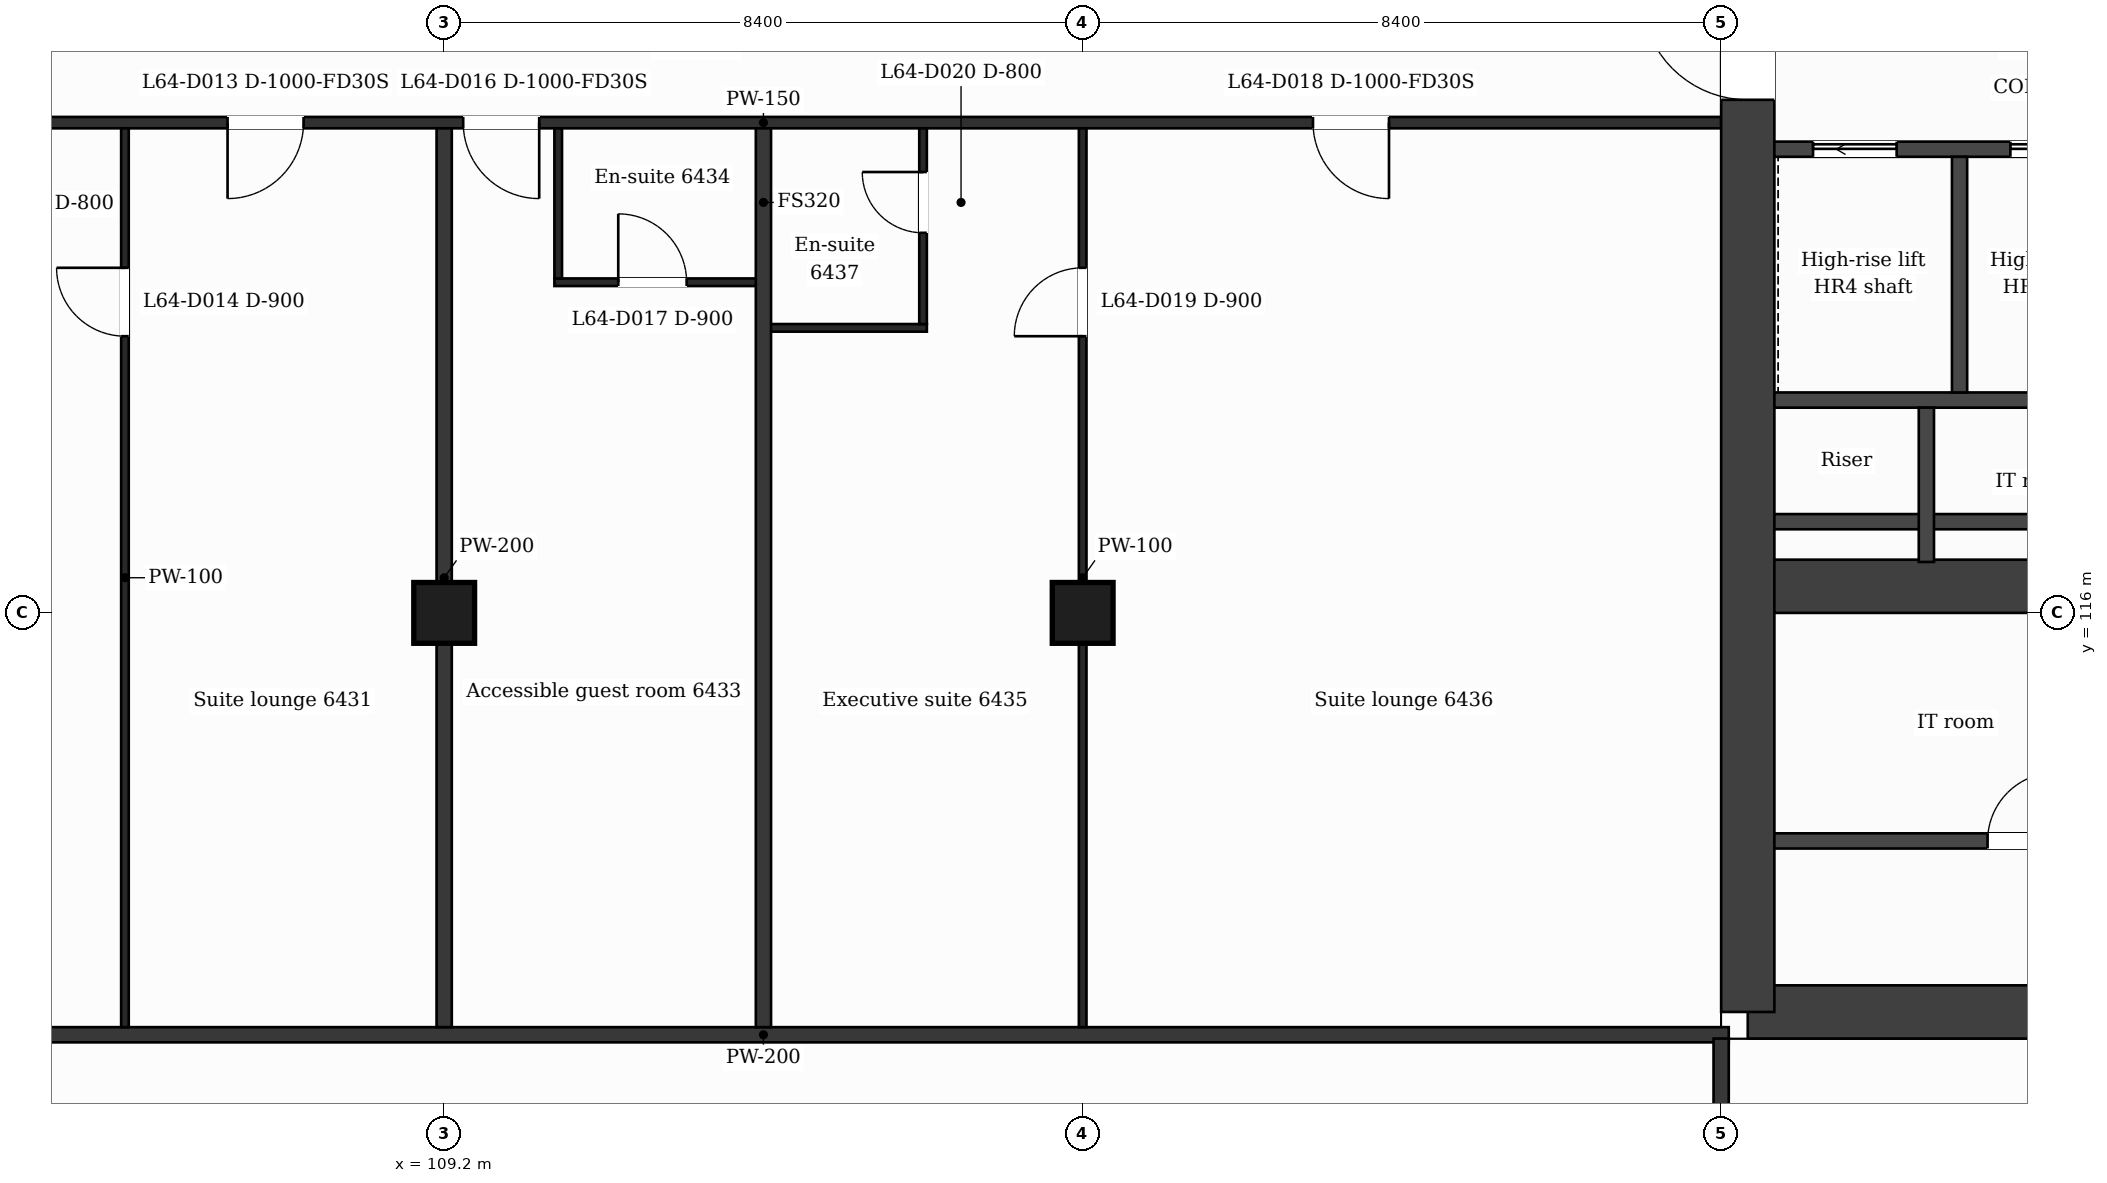
"""IFC4 building model, lengths in metres.
Left out: names, types, materials, properties, quantities, classifications, styles, units other than length and angle.
Written with IfcOpenShell. Run it as: python <this file> out.ifc"""

import sys

from ifc_helpers import new_model, si_unit, direction, frame, frame_2d, origin, origin_2d, place, context, subcontext, project, spatial, rectangle, extrude, element, fill, save


model = new_model("IFC4")
c1 = context("Model", 3, precision=1e-05, world=origin(), true_north=direction((0.0, 1.0)))
c2 = subcontext(c1, "Body", "Model", "MODEL_VIEW")
j1 = project(units=[si_unit("LENGTHUNIT", "METRE"), si_unit("PLANEANGLEUNIT", "RADIAN")], contexts=[c1])
p1 = place(None, origin())
s1 = spatial("IfcSite", under=j1, at=p1, CompositionType="ELEMENT")
p2 = place(p1, origin())
s2 = spatial("IfcBuilding", under=s1, at=p2, CompositionType="ELEMENT")
p3 = place(p2, frame((0.0, 0.0, 266.4)))
s3 = spatial("IfcBuildingStorey", under=s2, at=p3, CompositionType="ELEMENT", Elevation=266.4)
p4 = place(p3, frame((140.73, 110.75, 0.0), z_axis=(0.0, 0.0, 1.0), x_axis=(-1.0, 0.0, 0.0)))
e1 = element("IfcWall", 1, at=p4, inside=s3, PredefinedType="SHEAR", context=c2, shape_type="SweptSolid", body=[
    extrude(rectangle(XDim=14.38, YDim=0.7, at=frame_2d((7.19, 0.0))), origin(), (0.0, 0.0, 1.0), 3.7),
])
p5 = place(p4, frame((7.12, 0.0, 0.0)))
e2 = element("IfcOpeningElement", 2, at=p5, cuts=e1, PredefinedType="OPENING", context=c2, shape_type="SweptSolid", body=[
    extrude(rectangle(XDim=1.2, YDim=2.1, at=frame_2d((0.6, 1.05))), frame((0.0, 0.36, 0.0), z_axis=(0.0, -1.0, 0.0), x_axis=(1.0, 0.0, 0.0)), (0.0, 0.0, 1.0), 0.72),
])
p6 = place(p3, frame((126.35, 110.75, 0.0), z_axis=(0.0, 0.0, 1.0), x_axis=(0.0, 1.0, 0.0)))
e3 = element("IfcWall", 3, at=p6, inside=s3, PredefinedType="SHEAR", context=c2, shape_type="SweptSolid", body=[
    extrude(rectangle(XDim=21.3, YDim=0.7, at=frame_2d((10.65, 0.0))), origin(), (0.0, 0.0, 1.0), 3.7),
])
p7 = place(p6, frame((12.0, 0.0, 0.0)))
e4 = element("IfcOpeningElement", 4, at=p7, cuts=e3, PredefinedType="OPENING", context=c2, shape_type="SweptSolid", body=[
    extrude(rectangle(XDim=1.4, YDim=2.1, at=frame_2d((0.7, 1.05))), frame((0.0, 0.36, 0.0), z_axis=(0.0, -1.0, 0.0), x_axis=(1.0, 0.0, 0.0)), (0.0, 0.0, 1.0), 0.72),
])
p8 = place(p3, frame((126.7, 116.35, 0.0), z_axis=(0.0, 0.0, 1.0), x_axis=(1.0, 0.0, 0.0)))
e5 = element("IfcWall", 5, at=p8, inside=s3, PredefinedType="SHEAR", context=c2, shape_type="SweptSolid", body=[
    extrude(rectangle(XDim=5.5, YDim=0.7, at=frame_2d((2.75, 0.0))), origin(), (0.0, 0.0, 1.0), 3.7),
])
for number, where, z_axis, x_axis in (
    (6, (109.2, 116.0, 0.0), (0.0, 0.0, 1.0), (1.0, 0.0, 0.0)),
    (7, (117.6, 116.0, 0.0), (0.0, 0.0, 1.0), (1.0, 0.0, 0.0)),
):
    element("IfcColumn", number, at=place(p3, frame(where, z_axis=z_axis, x_axis=x_axis)), inside=s3, PredefinedType="COLUMN", context=c2, shape_type="SweptSolid", body=[
        extrude(rectangle(XDim=0.8, YDim=0.8, at=origin_2d()), origin(), (0.0, 0.0, 1.0), 3.7),
    ])
p9 = place(p3, frame((100.7, 110.45, 0.0), z_axis=(0.0, 0.0, 1.0), x_axis=(1.0, 0.0, 0.0)))
e8 = element("IfcWall", 8, at=p9, inside=s3, PredefinedType="PARTITIONING", context=c2, shape_type="SweptSolid", body=[
    extrude(rectangle(XDim=25.4, YDim=0.2, at=frame_2d((12.7, 0.0))), origin(), (0.0, 0.0, 1.0), 3.38),
])
p10 = place(p3, frame((126.7, 113.0, 0.0), z_axis=(0.0, 0.0, 1.0), x_axis=(1.0, 0.0, 0.0)))
e9 = element("IfcWall", 9, at=p10, inside=s3, PredefinedType="PARTITIONING", context=c2, shape_type="SweptSolid", body=[
    extrude(rectangle(XDim=4.973, YDim=0.2, at=frame_2d((2.487, 0.0))), origin(), (0.0, 0.0, 1.0), 3.38),
])
p11 = place(p10, frame((2.805, 0.0, 0.0)))
e10 = element("IfcOpeningElement", 10, at=p11, cuts=e9, PredefinedType="OPENING", context=c2, shape_type="SweptSolid", body=[
    extrude(rectangle(XDim=0.9, YDim=2.1, at=frame_2d((0.45, 1.05))), frame((0.0, 0.11, 0.0), z_axis=(0.0, -1.0, 0.0), x_axis=(1.0, 0.0, 0.0)), (0.0, 0.0, 1.0), 0.22),
])
for number, where, z_axis, x_axis in (
    (11, (126.7, 117.2, 0.0), (0.0, 0.0, 1.0), (1.0, 0.0, 0.0)),
    (12, (126.7, 118.8, 0.0), (0.0, 0.0, 1.0), (1.0, 0.0, 0.0)),
):
    element("IfcWall", number, at=place(p3, frame(where, z_axis=z_axis, x_axis=x_axis)), inside=s3, PredefinedType="PARTITIONING", context=c2, shape_type="SweptSolid", body=[
        extrude(rectangle(XDim=4.873, YDim=0.2, at=frame_2d((2.437, 0.0))), origin(), (0.0, 0.0, 1.0), 3.38),
    ])
p12 = place(p3, frame((113.4, 119.75, 0.0), z_axis=(0.0, 0.0, 1.0), x_axis=(1.0, 0.0, 0.0)))
e13 = element("IfcWall", 13, at=p12, inside=s3, PredefinedType="PARTITIONING", context=c2, shape_type="SweptSolid", body=[
    extrude(rectangle(XDim=2.15, YDim=0.1, at=frame_2d((1.075, 0.0))), origin(), (0.0, 0.0, 1.0), 3.38),
])
p13 = place(p3, frame((110.65, 120.35, 0.0), z_axis=(0.0, 0.0, 1.0), x_axis=(1.0, 0.0, 0.0)))
e14 = element("IfcWall", 14, at=p13, inside=s3, PredefinedType="PARTITIONING", context=c2, shape_type="SweptSolid", body=[
    extrude(rectangle(XDim=2.75, YDim=0.1, at=frame_2d((1.375, 0.0))), origin(), (0.0, 0.0, 1.0), 3.38),
])
p14 = place(p13, frame((0.84, 0.0, 0.0)))
e15 = element("IfcOpeningElement", 15, at=p14, cuts=e14, PredefinedType="OPENING", context=c2, shape_type="SweptSolid", body=[
    extrude(rectangle(XDim=0.9, YDim=2.1, at=frame_2d((0.45, 1.05))), frame((0.0, 0.06, 0.0), z_axis=(0.0, -1.0, 0.0), x_axis=(1.0, 0.0, 0.0)), (0.0, 0.0, 1.0), 0.12),
])
p15 = place(p3, frame((126.7, 122.1, 0.0), z_axis=(0.0, 0.0, 1.0), x_axis=(1.0, 0.0, 0.0)))
e16 = element("IfcWall", 16, at=p15, inside=s3, PredefinedType="PARTITIONING", context=c2, shape_type="SweptSolid", body=[
    extrude(rectangle(XDim=4.873, YDim=0.2, at=frame_2d((2.437, 0.0))), origin(), (0.0, 0.0, 1.0), 3.38),
])
p16 = place(p15, frame((3.105, 0.0, 0.0)))
e17 = element("IfcOpeningElement", 17, at=p16, cuts=e16, PredefinedType="OPENING", context=c2, shape_type="SweptSolid", body=[
    extrude(rectangle(XDim=1.1, YDim=2.1, at=frame_2d((0.55, 1.05))), frame((0.0, 0.11, 0.0), z_axis=(0.0, -1.0, 0.0), x_axis=(1.0, 0.0, 0.0)), (0.0, 0.0, 1.0), 0.22),
])
p17 = place(p15, frame((0.509, 0.0, 0.0)))
e18 = element("IfcOpeningElement", 18, at=p17, cuts=e16, PredefinedType="OPENING", context=c2, shape_type="SweptSolid", body=[
    extrude(rectangle(XDim=1.1, YDim=2.1, at=frame_2d((0.55, 1.05))), frame((0.0, 0.11, 0.0), z_axis=(0.0, -1.0, 0.0), x_axis=(1.0, 0.0, 0.0)), (0.0, 0.0, 1.0), 0.22),
])
p18 = place(p3, frame((100.8, 122.45, 0.0), z_axis=(0.0, 0.0, 1.0), x_axis=(1.0, 0.0, 0.0)))
e19 = element("IfcWall", 19, at=p18, inside=s3, PredefinedType="PARTITIONING", context=c2, shape_type="SweptSolid", body=[
    extrude(rectangle(XDim=25.2, YDim=0.15, at=frame_2d((12.6, 0.0))), origin(), (0.0, 0.0, 1.0), 3.38),
])
p19 = place(p18, frame((5.55, 0.0, 0.0)))
e20 = element("IfcOpeningElement", 20, at=p19, cuts=e19, PredefinedType="OPENING", context=c2, shape_type="SweptSolid", body=[
    extrude(rectangle(XDim=1.0, YDim=2.1, at=frame_2d((0.5, 1.05))), frame((0.0, 0.085, 0.0), z_axis=(0.0, -1.0, 0.0), x_axis=(1.0, 0.0, 0.0)), (0.0, 0.0, 1.0), 0.17),
])
p20 = place(p18, frame((8.65, 0.0, 0.0)))
e21 = element("IfcOpeningElement", 21, at=p20, cuts=e19, PredefinedType="OPENING", context=c2, shape_type="SweptSolid", body=[
    extrude(rectangle(XDim=1.0, YDim=2.1, at=frame_2d((0.5, 1.05))), frame((0.0, 0.085, 0.0), z_axis=(0.0, -1.0, 0.0), x_axis=(1.0, 0.0, 0.0)), (0.0, 0.0, 1.0), 0.17),
])
p21 = place(p18, frame((19.83, 0.0, 0.0)))
e22 = element("IfcOpeningElement", 22, at=p21, cuts=e19, PredefinedType="OPENING", context=c2, shape_type="SweptSolid", body=[
    extrude(rectangle(XDim=1.0, YDim=2.1, at=frame_2d((0.5, 1.05))), frame((0.0, 0.085, 0.0), z_axis=(0.0, -1.0, 0.0), x_axis=(1.0, 0.0, 0.0)), (0.0, 0.0, 1.0), 0.17),
])
p22 = place(p3, frame((105.0, 110.55, 0.0), z_axis=(0.0, 0.0, 1.0), x_axis=(0.0, 1.0, 0.0)))
e23 = element("IfcWall", 23, at=p22, inside=s3, PredefinedType="PARTITIONING", context=c2, shape_type="SweptSolid", body=[
    extrude(rectangle(XDim=11.825, YDim=0.1, at=frame_2d((5.913, 0.0))), origin(), (0.0, 0.0, 1.0), 3.38),
])
p23 = place(p22, frame((9.09, 0.0, 0.0)))
e24 = element("IfcOpeningElement", 24, at=p23, cuts=e23, PredefinedType="OPENING", context=c2, shape_type="SweptSolid", body=[
    extrude(rectangle(XDim=0.9, YDim=2.1, at=frame_2d((0.45, 1.05))), frame((0.0, 0.06, 0.0), z_axis=(0.0, -1.0, 0.0), x_axis=(1.0, 0.0, 0.0)), (0.0, 0.0, 1.0), 0.12),
])
p24 = place(p3, frame((109.2, 110.55, 0.0), z_axis=(0.0, 0.0, 1.0), x_axis=(0.0, 1.0, 0.0)))
e25 = element("IfcWall", 25, at=p24, inside=s3, PredefinedType="PARTITIONING", context=c2, shape_type="SweptSolid", body=[
    extrude(rectangle(XDim=11.825, YDim=0.2, at=frame_2d((5.913, 0.0))), origin(), (0.0, 0.0, 1.0), 3.38),
])
p25 = place(p3, frame((110.7, 120.4, 0.0), z_axis=(0.0, 0.0, 1.0), x_axis=(0.0, 1.0, 0.0)))
e26 = element("IfcWall", 26, at=p25, inside=s3, PredefinedType="PARTITIONING", context=c2, shape_type="SweptSolid", body=[
    extrude(rectangle(XDim=1.975, YDim=0.1, at=frame_2d((0.988, 0.0))), origin(), (0.0, 0.0, 1.0), 3.38),
])
p26 = place(p3, frame((113.4, 110.55, 0.0), z_axis=(0.0, 0.0, 1.0), x_axis=(0.0, 1.0, 0.0)))
e27 = element("IfcWall", 27, at=p26, inside=s3, PredefinedType="PARTITIONING", context=c2, shape_type="SweptSolid", body=[
    extrude(rectangle(XDim=11.825, YDim=0.2, at=frame_2d((5.913, 0.0))), origin(), (0.0, 0.0, 1.0), 3.38),
])
p27 = place(p3, frame((115.5, 119.8, 0.0), z_axis=(0.0, 0.0, 1.0), x_axis=(0.0, 1.0, 0.0)))
e28 = element("IfcWall", 28, at=p27, inside=s3, PredefinedType="PARTITIONING", context=c2, shape_type="SweptSolid", body=[
    extrude(rectangle(XDim=2.575, YDim=0.1, at=frame_2d((1.288, 0.0))), origin(), (0.0, 0.0, 1.0), 3.38),
])
p28 = place(p27, frame((1.2, 0.0, 0.0)))
e29 = element("IfcOpeningElement", 29, at=p28, cuts=e28, PredefinedType="OPENING", context=c2, shape_type="SweptSolid", body=[
    extrude(rectangle(XDim=0.8, YDim=2.1, at=frame_2d((0.4, 1.05))), frame((0.0, 0.06, 0.0), z_axis=(0.0, -1.0, 0.0), x_axis=(1.0, 0.0, 0.0)), (0.0, 0.0, 1.0), 0.12),
])
p29 = place(p3, frame((117.6, 110.55, 0.0), z_axis=(0.0, 0.0, 1.0), x_axis=(0.0, 1.0, 0.0)))
e30 = element("IfcWall", 30, at=p29, inside=s3, PredefinedType="PARTITIONING", context=c2, shape_type="SweptSolid", body=[
    extrude(rectangle(XDim=11.825, YDim=0.1, at=frame_2d((5.913, 0.0))), origin(), (0.0, 0.0, 1.0), 3.38),
])
p30 = place(p29, frame((9.09, 0.0, 0.0)))
e31 = element("IfcOpeningElement", 31, at=p30, cuts=e30, PredefinedType="OPENING", context=c2, shape_type="SweptSolid", body=[
    extrude(rectangle(XDim=0.9, YDim=2.1, at=frame_2d((0.45, 1.05))), frame((0.0, 0.06, 0.0), z_axis=(0.0, -1.0, 0.0), x_axis=(1.0, 0.0, 0.0)), (0.0, 0.0, 1.0), 0.12),
])
p31 = place(p3, frame((126.0, 108.79, 0.0), z_axis=(0.0, 0.0, 1.0), x_axis=(0.0, 1.0, 0.0)))
e32 = element("IfcWall", 32, at=p31, inside=s3, PredefinedType="PARTITIONING", context=c2, shape_type="SweptSolid", body=[
    extrude(rectangle(XDim=1.61, YDim=0.2, at=frame_2d((0.805, 0.0))), origin(), (0.0, 0.0, 1.0), 3.38),
])
p32 = place(p3, frame((128.7, 116.67, 0.0), z_axis=(0.0, 0.0, 1.0), x_axis=(0.0, 1.0, 0.0)))
e33 = element("IfcWall", 33, at=p32, inside=s3, PredefinedType="PARTITIONING", context=c2, shape_type="SweptSolid", body=[
    extrude(rectangle(XDim=2.03, YDim=0.2, at=frame_2d((1.015, 0.0))), origin(), (0.0, 0.0, 1.0), 3.38),
])
p33 = place(p3, frame((129.136, 118.9, 0.0), z_axis=(0.0, 0.0, 1.0), x_axis=(0.0, 1.0, 0.0)))
e34 = element("IfcWall", 34, at=p33, inside=s3, PredefinedType="PARTITIONING", context=c2, shape_type="SweptSolid", body=[
    extrude(rectangle(XDim=3.1, YDim=0.2, at=frame_2d((1.55, 0.0))), origin(), (0.0, 0.0, 1.0), 3.38),
])
p34 = place(p16, origin())
e35 = element("IfcDoor", 35, at=p34, inside=s3, OperationType="SLIDING_TO_LEFT", PredefinedType="DOOR", context=c2, shape_type="SweptSolid", body=[
    extrude(rectangle(XDim=1.1, YDim=2.1, at=frame_2d((0.55, 1.05))), frame((0.0, 0.025, 0.0), z_axis=(0.0, -1.0, 0.0), x_axis=(1.0, 0.0, 0.0)), (0.0, 0.0, 1.0), 0.05),
])
fill(e17, e35)
p35 = place(p17, origin())
e36 = element("IfcDoor", 36, at=p35, inside=s3, OperationType="SLIDING_TO_LEFT", PredefinedType="DOOR", context=c2, shape_type="SweptSolid", body=[
    extrude(rectangle(XDim=1.1, YDim=2.1, at=frame_2d((0.55, 1.05))), frame((0.0, 0.025, 0.0), z_axis=(0.0, -1.0, 0.0), x_axis=(1.0, 0.0, 0.0)), (0.0, 0.0, 1.0), 0.05),
])
fill(e18, e36)
p36 = place(p11, origin())
e37 = element("IfcDoor", 37, at=p36, inside=s3, OperationType="SINGLE_SWING_RIGHT", PredefinedType="DOOR", context=c2, shape_type="SweptSolid", body=[
    extrude(rectangle(XDim=0.9, YDim=2.1, at=frame_2d((0.45, 1.05))), frame((0.0, 0.025, 0.0), z_axis=(0.0, -1.0, 0.0), x_axis=(1.0, 0.0, 0.0)), (0.0, 0.0, 1.0), 0.05),
])
fill(e10, e37)
p37 = place(p19, origin())
e38 = element("IfcDoor", 38, at=p37, inside=s3, OperationType="SINGLE_SWING_LEFT", PredefinedType="DOOR", context=c2, shape_type="SweptSolid", body=[
    extrude(rectangle(XDim=1.0, YDim=2.1, at=frame_2d((0.5, 1.05))), frame((0.0, 0.025, 0.0), z_axis=(0.0, -1.0, 0.0), x_axis=(1.0, 0.0, 0.0)), (0.0, 0.0, 1.0), 0.05),
])
fill(e20, e38)
p38 = place(p23, origin())
e39 = element("IfcDoor", 39, at=p38, inside=s3, OperationType="SINGLE_SWING_RIGHT", PredefinedType="DOOR", context=c2, shape_type="SweptSolid", body=[
    extrude(rectangle(XDim=0.9, YDim=2.1, at=frame_2d((0.45, 1.05))), frame((0.0, 0.025, 0.0), z_axis=(0.0, -1.0, 0.0), x_axis=(1.0, 0.0, 0.0)), (0.0, 0.0, 1.0), 0.05),
])
fill(e24, e39)
p39 = place(p20, origin())
e40 = element("IfcDoor", 40, at=p39, inside=s3, OperationType="SINGLE_SWING_RIGHT", PredefinedType="DOOR", context=c2, shape_type="SweptSolid", body=[
    extrude(rectangle(XDim=1.0, YDim=2.1, at=frame_2d((0.5, 1.05))), frame((0.0, 0.025, 0.0), z_axis=(0.0, -1.0, 0.0), x_axis=(1.0, 0.0, 0.0)), (0.0, 0.0, 1.0), 0.05),
])
fill(e21, e40)
p40 = place(p14, origin())
e41 = element("IfcDoor", 41, at=p40, inside=s3, OperationType="SINGLE_SWING_LEFT", PredefinedType="DOOR", context=c2, shape_type="SweptSolid", body=[
    extrude(rectangle(XDim=0.9, YDim=2.1, at=frame_2d((0.45, 1.05))), frame((0.0, 0.025, 0.0), z_axis=(0.0, -1.0, 0.0), x_axis=(1.0, 0.0, 0.0)), (0.0, 0.0, 1.0), 0.05),
])
fill(e15, e41)
p41 = place(p21, origin())
e42 = element("IfcDoor", 42, at=p41, inside=s3, OperationType="SINGLE_SWING_RIGHT", PredefinedType="DOOR", context=c2, shape_type="SweptSolid", body=[
    extrude(rectangle(XDim=1.0, YDim=2.1, at=frame_2d((0.5, 1.05))), frame((0.0, 0.025, 0.0), z_axis=(0.0, -1.0, 0.0), x_axis=(1.0, 0.0, 0.0)), (0.0, 0.0, 1.0), 0.05),
])
fill(e22, e42)
p42 = place(p30, origin())
e43 = element("IfcDoor", 43, at=p42, inside=s3, OperationType="SINGLE_SWING_LEFT", PredefinedType="DOOR", context=c2, shape_type="SweptSolid", body=[
    extrude(rectangle(XDim=0.9, YDim=2.1, at=frame_2d((0.45, 1.05))), frame((0.0, 0.025, 0.0), z_axis=(0.0, -1.0, 0.0), x_axis=(1.0, 0.0, 0.0)), (0.0, 0.0, 1.0), 0.05),
])
fill(e31, e43)
p43 = place(p28, origin())
e44 = element("IfcDoor", 44, at=p43, inside=s3, OperationType="SINGLE_SWING_RIGHT", PredefinedType="DOOR", context=c2, shape_type="SweptSolid", body=[
    extrude(rectangle(XDim=0.8, YDim=2.1, at=frame_2d((0.4, 1.05))), frame((0.0, 0.025, 0.0), z_axis=(0.0, -1.0, 0.0), x_axis=(1.0, 0.0, 0.0)), (0.0, 0.0, 1.0), 0.05),
])
fill(e29, e44)
p44 = place(p7, origin())
e45 = element("IfcDoor", 45, at=p44, inside=s3, OperationType="SINGLE_SWING_RIGHT", PredefinedType="DOOR", context=c2, shape_type="SweptSolid", body=[
    extrude(rectangle(XDim=1.4, YDim=2.1, at=frame_2d((0.7, 1.05))), frame((0.0, 0.025, 0.0), z_axis=(0.0, -1.0, 0.0), x_axis=(1.0, 0.0, 0.0)), (0.0, 0.0, 1.0), 0.05),
])
fill(e4, e45)
save(model, sys.argv[1])
